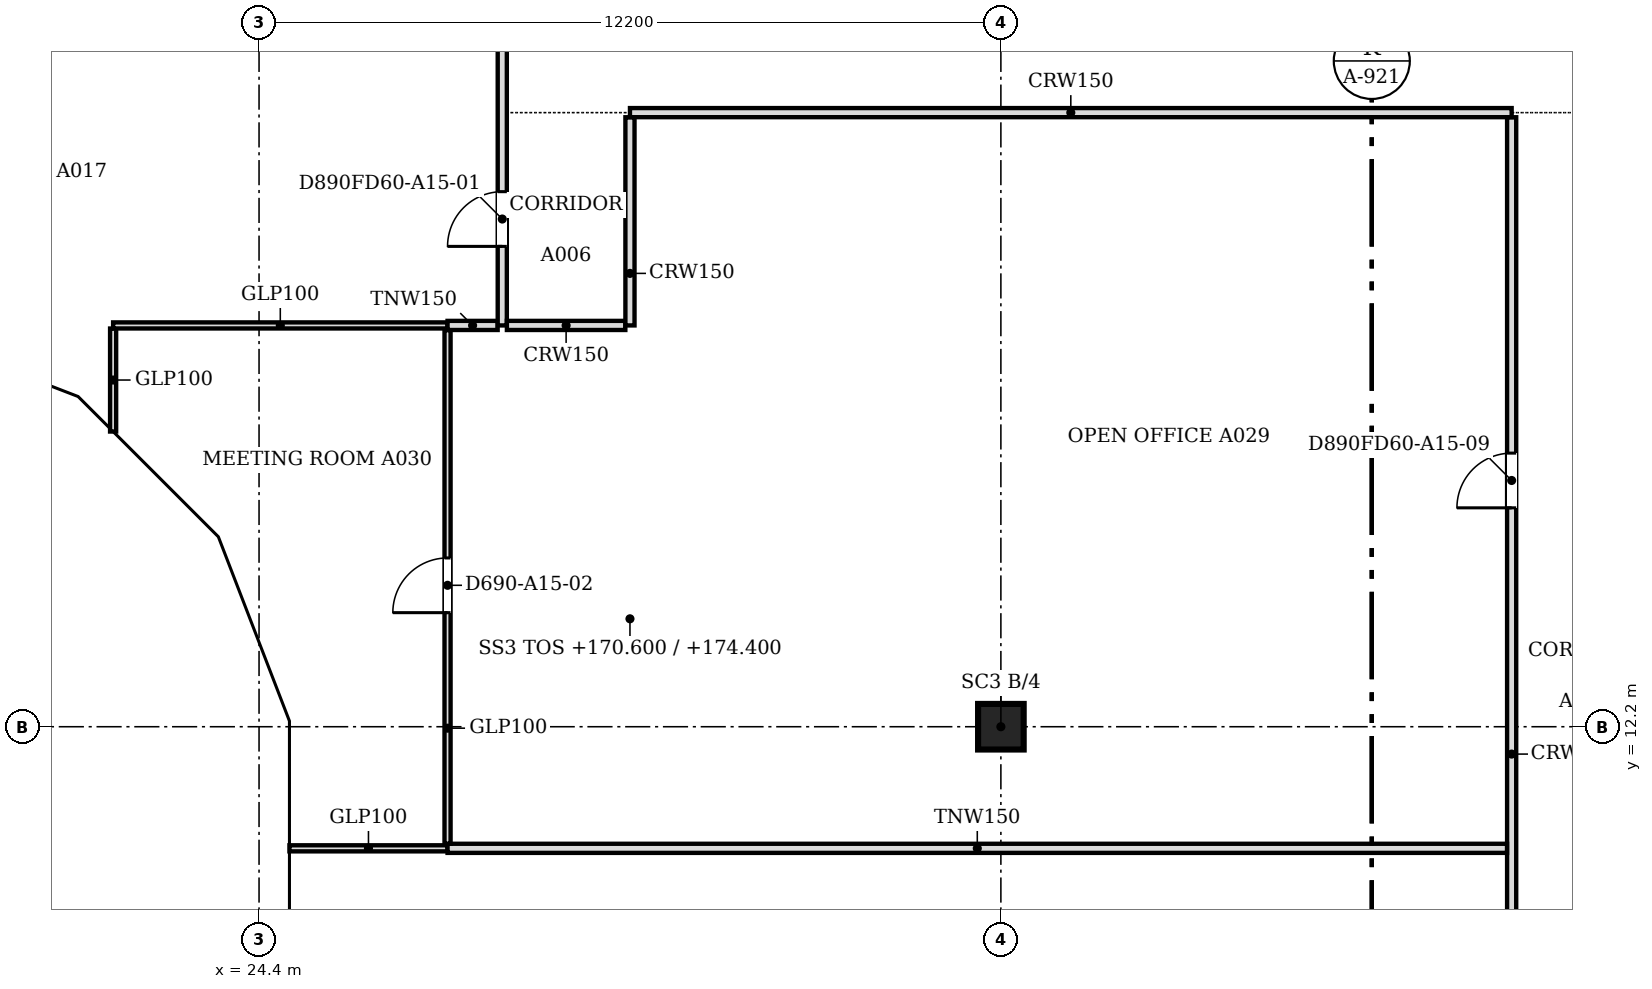
"""IFC4 building model, lengths in metres.
Left out: names, types, materials, properties, quantities, classifications, styles, units other than length and angle.
Written with IfcOpenShell. Run it as: python <this file> out.ifc"""

import sys

from ifc_helpers import new_model, si_unit, direction, frame, frame_2d, origin, origin_2d, place, context, subcontext, project, spatial, polyline, rectangle, outline, extrude, faceted_brep, source, transform, mapped, element, fill, save


model = new_model("IFC4")
c1 = context("Model", 3, precision=1e-05, world=origin(), true_north=direction((0.0, 1.0)))
c2 = subcontext(c1, "Body", "Model", "MODEL_VIEW")
j1 = project(units=[si_unit("LENGTHUNIT", "METRE"), si_unit("PLANEANGLEUNIT", "RADIAN")], contexts=[c1])
p1 = place(None, origin())
s1 = spatial("IfcSite", under=j1, at=p1, CompositionType="ELEMENT")
p2 = place(p1, origin())
s2 = spatial("IfcBuilding", under=s1, at=p2, CompositionType="ELEMENT")
p3 = place(p2, frame((0.0, 0.0, 170.6)))
s3 = spatial("IfcBuildingStorey", under=s2, at=p3, CompositionType="ELEMENT", Elevation=170.6)
p4 = place(p3, frame((36.6, 12.2, 0.0), z_axis=(0.0, 0.0, 1.0), x_axis=(1.0, 0.0, 0.0)))
e1 = element("IfcColumn", 1, at=p4, inside=s3, PredefinedType="COLUMN", context=c2, shape_type="SweptSolid", body=[
    extrude(rectangle(XDim=0.75, YDim=0.75, at=origin_2d()), origin(), (0.0, 0.0, 1.0), 3.6),
])
m1 = source(origin(), c2, "Body", "Brep", [
    faceted_brep([(0.093, -0.25, 0.056), (3.143, -0.25, 3.736), (3.143, -0.25, 3.864), (0.093, -0.25, 7.544), (0.0, 0.25, 7.543), (0.047, 0.25, 7.6), (3.196, 0.25, 3.8), (0.047, 0.25, 0.0), (0.0, 0.25, 0.057), (3.196, -0.0, 3.8), (0.047, 0.0, 0.0), (0.047, 0.0, 7.6)], [[[0, 1, 2, 3]], [[4, 5, 6, 7, 8]], [[7, 6, 9, 1, 0, 10]], [[6, 5, 11, 3, 2, 9]], [[5, 4, 11]], [[8, 7, 10]], [[8, 10, 0, 3, 11, 4]], [[1, 9, 2]]]),
])
p5 = place(p3, frame((18.303, 18.567, -3.8), z_axis=(0.0, 0.0, 1.0), x_axis=(0.932978940178, -0.359930961693, 0.0)))
e2 = element("IfcWall", 2, at=p5, inside=s3, PredefinedType="SOLIDWALL", context=c2, shape_type="MappedRepresentation", body=[
    mapped(m1, transform((0.0, 0.0, 0.0), scale=1.0)),
])
m2 = source(origin(), c2, "Body", "SweptSolid", [
    extrude(outline(polyline([(0.247, 0.633), (2.871, 3.8), (0.247, 6.967), (0.247, 0.633)])), frame((0.0, 0.26, 0.0), z_axis=(0.0, -1.0, 0.0), x_axis=(1.0, 0.0, 0.0)), (0.0, 0.0, 1.0), 0.52),
])
p6 = place(p5, origin())
e3 = element("IfcOpeningElement", 3, at=p6, cuts=e2, PredefinedType="OPENING", context=c2, shape_type="MappedRepresentation", body=[
    mapped(m2, transform((0.0, 0.0, 0.0), scale=1.0)),
])
m3 = source(origin(), c2, "Body", "Brep", [
    faceted_brep([(3.103, -0.25, 7.536), (0.053, -0.25, 3.864), (0.053, -0.25, 3.736), (3.103, -0.25, 0.064), (0.0, 0.25, 3.8), (3.156, 0.25, 7.6), (3.209, 0.25, 7.536), (3.209, 0.25, 0.064), (3.156, 0.25, 0.0), (3.156, -0.0, 0.0), (3.156, -0.0, 7.6), (0.0, 0.0, 3.8)], [[[0, 1, 2, 3]], [[4, 5, 6, 7, 8]], [[8, 7, 9]], [[6, 5, 10]], [[5, 4, 11, 1, 0, 10]], [[4, 8, 9, 3, 2, 11]], [[2, 1, 11]], [[3, 9, 7, 6, 10, 0]]]),
])
p7 = place(p3, frame((21.285, 17.417, -3.8), z_axis=(0.0, 0.0, 1.0), x_axis=(0.707106781187, -0.707106781187, 0.0)))
e4 = element("IfcWall", 4, at=p7, inside=s3, PredefinedType="SOLIDWALL", context=c2, shape_type="MappedRepresentation", body=[
    mapped(m3, transform((0.0, 0.0, 0.0), scale=1.0)),
])
m4 = source(origin(), c2, "Body", "SweptSolid", [
    extrude(outline(polyline([(2.956, 6.968), (0.325, 3.8), (2.956, 0.632), (2.956, 6.968)])), frame((0.0, 0.26, 0.0), z_axis=(0.0, -1.0, 0.0), x_axis=(1.0, 0.0, 0.0)), (0.0, 0.0, 1.0), 0.52),
])
p8 = place(p7, origin())
e5 = element("IfcOpeningElement", 5, at=p8, cuts=e4, PredefinedType="OPENING", context=c2, shape_type="MappedRepresentation", body=[
    mapped(m4, transform((0.0, 0.0, 0.0), scale=1.0)),
])
m5 = source(origin(), c2, "Body", "Brep", [
    faceted_brep([(0.106, -0.25, 0.064), (3.156, -0.25, 3.744), (3.156, -0.25, 3.856), (0.106, -0.25, 7.536), (0.0, 0.25, 7.536), (0.053, 0.25, 7.6), (3.202, 0.25, 3.8), (0.053, 0.25, 0.0), (0.0, 0.25, 0.064), (3.202, -0.0, 3.8), (0.053, 0.0, 0.0), (0.053, 0.0, 7.6)], [[[0, 1, 2, 3]], [[4, 5, 6, 7, 8]], [[7, 6, 9, 1, 0, 10]], [[6, 5, 11, 3, 2, 9]], [[5, 4, 11]], [[8, 7, 10]], [[8, 10, 0, 3, 11, 4]], [[1, 9, 2]]]),
])
p9 = place(p3, frame((23.497, 15.234, -3.8), z_axis=(0.0, 0.0, 1.0), x_axis=(0.359913782069, -0.932985567668, 0.0)))
e6 = element("IfcWall", 6, at=p9, inside=s3, PredefinedType="SOLIDWALL", context=c2, shape_type="MappedRepresentation", body=[
    mapped(m5, transform((0.0, 0.0, 0.0), scale=1.0)),
])
m6 = source(origin(), c2, "Body", "SweptSolid", [
    extrude(outline(polyline([(0.253, 0.633), (2.878, 3.8), (0.253, 6.967), (0.253, 0.633)])), frame((0.0, 0.26, 0.0), z_axis=(0.0, -1.0, 0.0), x_axis=(1.0, 0.0, 0.0)), (0.0, 0.0, 1.0), 0.52),
])
p10 = place(p9, origin())
e7 = element("IfcOpeningElement", 7, at=p10, cuts=e6, PredefinedType="OPENING", context=c2, shape_type="MappedRepresentation", body=[
    mapped(m6, transform((0.0, 0.0, 0.0), scale=1.0)),
])
m7 = source(origin(), c2, "Body", "Brep", [
    faceted_brep([(3.096, -0.25, 0.0), (6.1, -0.25, 3.8), (3.096, -0.25, 7.6), (0.047, -0.25, 3.857), (0.047, -0.25, 3.743), (0.0, 0.25, 3.8), (3.096, 0.25, 7.6), (6.053, 0.25, 3.859), (6.053, 0.25, 3.741), (3.096, 0.25, 0.0), (6.1, -0.0, 3.8), (0.0, 0.0, 3.8)], [[[0, 1, 2, 3, 4]], [[5, 6, 7, 8, 9]], [[9, 8, 10, 1, 0]], [[7, 6, 2, 1, 10]], [[6, 5, 11, 3, 2]], [[5, 9, 0, 4, 11]], [[4, 3, 11]], [[8, 7, 10]]]),
])
p11 = place(p3, frame((24.65, 12.247, -3.8), z_axis=(0.0, 0.0, 1.0), x_axis=(0.0, -1.0, 0.0)))
e8 = element("IfcWall", 8, at=p11, inside=s3, PredefinedType="SOLIDWALL", context=c2, shape_type="MappedRepresentation", body=[
    mapped(m7, transform((0.0, 0.0, 0.0), scale=1.0)),
])
m8 = source(origin(), c2, "Body", "SweptSolid", [
    extrude(outline(polyline([(3.094, 0.399), (5.781, 3.8), (3.094, 7.2), (0.323, 3.8), (3.094, 0.399)])), frame((0.0, 0.26, 0.0), z_axis=(0.0, -1.0, 0.0), x_axis=(1.0, 0.0, 0.0)), (0.0, 0.0, 1.0), 0.52),
])
p12 = place(p11, origin())
e9 = element("IfcOpeningElement", 9, at=p12, cuts=e8, PredefinedType="OPENING", context=c2, shape_type="MappedRepresentation", body=[
    mapped(m8, transform((0.0, 0.0, 0.0), scale=1.0)),
])
p13 = place(p2, frame((0.0, 0.0, 174.4)))
s4 = spatial("IfcBuildingStorey", under=s2, at=p13, CompositionType="ELEMENT", Elevation=174.4)
m9 = source(origin(), c2, "Body", "Brep", [
    faceted_brep([(3.096, -0.25, 7.536), (0.047, -0.25, 3.856), (0.047, -0.25, 3.744), (3.096, -0.25, 0.064), (0.0, 0.25, 3.8), (3.149, 0.25, 7.6), (3.202, 0.25, 7.536), (3.202, 0.25, 0.064), (3.149, 0.25, 0.0), (3.149, -0.0, 0.0), (3.149, -0.0, 7.6), (0.0, 0.0, 3.8)], [[[0, 1, 2, 3]], [[4, 5, 6, 7, 8]], [[8, 7, 9]], [[6, 5, 10]], [[5, 4, 11, 1, 0, 10]], [[4, 8, 9, 3, 2, 11]], [[11, 2, 1]], [[3, 9, 7, 6, 10, 0]]]),
])
p14 = place(p13, frame((18.346, 18.55, -3.8), z_axis=(0.0, 0.0, 1.0), x_axis=(0.932985567668, -0.359913782069, 0.0)))
e10 = element("IfcWall", 10, at=p14, inside=s4, PredefinedType="SOLIDWALL", context=c2, shape_type="MappedRepresentation", body=[
    mapped(m9, transform((0.0, 0.0, 0.0), scale=1.0)),
])
m10 = source(origin(), c2, "Body", "SweptSolid", [
    extrude(outline(polyline([(2.949, 6.967), (0.325, 3.8), (2.949, 0.633), (2.949, 6.967)])), frame((0.0, 0.26, 0.0), z_axis=(0.0, -1.0, 0.0), x_axis=(1.0, 0.0, 0.0)), (0.0, 0.0, 1.0), 0.52),
])
p15 = place(p14, origin())
e11 = element("IfcOpeningElement", 11, at=p15, cuts=e10, PredefinedType="OPENING", context=c2, shape_type="MappedRepresentation", body=[
    mapped(m10, transform((0.0, 0.0, 0.0), scale=1.0)),
])
m11 = source(origin(), c2, "Body", "Brep", [
    faceted_brep([(0.106, -0.25, 0.064), (3.156, -0.25, 3.736), (3.156, -0.25, 3.864), (0.106, -0.25, 7.536), (0.0, 0.25, 7.536), (0.053, 0.25, 7.6), (3.209, 0.25, 3.8), (0.053, 0.25, 0.0), (0.0, 0.25, 0.064), (3.209, -0.0, 3.8), (0.053, 0.0, 0.0), (0.053, 0.0, 7.6)], [[[0, 1, 2, 3]], [[4, 5, 6, 7, 8]], [[7, 6, 9, 1, 0, 10]], [[6, 5, 11, 3, 2, 9]], [[5, 4, 11]], [[8, 7, 10]], [[8, 10, 0, 3, 11, 4]], [[1, 9, 2]]]),
])
p16 = place(p13, frame((21.248, 17.454, -3.8), z_axis=(0.0, 0.0, 1.0), x_axis=(0.707106781187, -0.707106781187, 0.0)))
e12 = element("IfcWall", 12, at=p16, inside=s4, PredefinedType="SOLIDWALL", context=c2, shape_type="MappedRepresentation", body=[
    mapped(m11, transform((0.0, 0.0, 0.0), scale=1.0)),
])
m12 = source(origin(), c2, "Body", "SweptSolid", [
    extrude(outline(polyline([(0.253, 0.632), (2.884, 3.8), (0.253, 6.968), (0.253, 0.632)])), frame((0.0, 0.26, 0.0), z_axis=(0.0, -1.0, 0.0), x_axis=(1.0, 0.0, 0.0)), (0.0, 0.0, 1.0), 0.52),
])
p17 = place(p16, origin())
e13 = element("IfcOpeningElement", 13, at=p17, cuts=e12, PredefinedType="OPENING", context=c2, shape_type="MappedRepresentation", body=[
    mapped(m12, transform((0.0, 0.0, 0.0), scale=1.0)),
])
m13 = source(origin(), c2, "Body", "Brep", [
    faceted_brep([(3.103, -0.25, 7.544), (0.053, -0.25, 3.864), (0.053, -0.25, 3.736), (3.103, -0.25, 0.056), (0.0, 0.25, 3.8), (3.149, 0.25, 7.6), (3.196, 0.25, 7.543), (3.196, 0.25, 0.057), (3.149, 0.25, 0.0), (3.149, -0.0, 0.0), (3.149, -0.0, 7.6), (0.0, 0.0, 3.8)], [[[0, 1, 2, 3]], [[4, 5, 6, 7, 8]], [[8, 7, 9]], [[6, 5, 10]], [[5, 4, 11, 1, 0, 10]], [[4, 8, 9, 3, 2, 11]], [[11, 2, 1]], [[3, 9, 7, 6, 10, 0]]]),
])
p18 = place(p13, frame((23.517, 15.185, -3.8), z_axis=(0.0, 0.0, 1.0), x_axis=(0.359864468756, -0.933004589553, 0.0)))
e14 = element("IfcWall", 14, at=p18, inside=s4, PredefinedType="SOLIDWALL", context=c2, shape_type="MappedRepresentation", body=[
    mapped(m13, transform((0.0, 0.0, 0.0), scale=1.0)),
])
p19 = place(p18, origin())
e15 = element("IfcOpeningElement", 15, at=p19, cuts=e14, PredefinedType="OPENING", context=c2, shape_type="MappedRepresentation", body=[
    mapped(m10, transform((0.0, 0.0, 0.0), scale=1.0)),
])
m14 = source(origin(), c2, "Body", "Brep", [
    faceted_brep([(0.093, -0.25, 0.057), (3.143, -0.25, 3.8), (0.093, -0.25, 7.543), (0.0, 0.25, 7.544), (0.047, 0.25, 7.6), (3.143, 0.25, 3.8), (0.047, 0.25, 0.0), (0.0, 0.25, 0.056), (0.047, 0.0, 0.0), (0.047, 0.0, 7.6)], [[[0, 1, 2]], [[3, 4, 5, 6, 7]], [[6, 5, 1, 0, 8]], [[5, 4, 9, 2, 1]], [[4, 3, 9]], [[7, 6, 8]], [[7, 8, 0, 2, 9, 3]]]),
])
p20 = place(p13, frame((24.65, 12.293, -3.8), z_axis=(0.0, 0.0, 1.0), x_axis=(0.0, -1.0, 0.0)))
e16 = element("IfcWall", 16, at=p20, inside=s4, PredefinedType="SOLIDWALL", context=c2, shape_type="MappedRepresentation", body=[
    mapped(m14, transform((0.0, 0.0, 0.0), scale=1.0)),
])
m15 = source(origin(), c2, "Body", "SweptSolid", [
    extrude(outline(polyline([(0.247, 0.641), (2.821, 3.8), (0.247, 6.959), (0.247, 0.641)])), frame((0.0, 0.26, 0.0), z_axis=(0.0, -1.0, 0.0), x_axis=(1.0, 0.0, 0.0)), (0.0, 0.0, 1.0), 0.52),
])
p21 = place(p20, origin())
e17 = element("IfcOpeningElement", 17, at=p21, cuts=e16, PredefinedType="OPENING", context=c2, shape_type="MappedRepresentation", body=[
    mapped(m15, transform((0.0, 0.0, 0.0), scale=1.0)),
])
p22 = place(p3, frame((45.0, 0.5, 0.0), z_axis=(0.0, 0.0, 1.0), x_axis=(0.0, 1.0, 0.0)))
e18 = element("IfcWall", 18, at=p22, inside=s3, PredefinedType="PARTITIONING", context=c2, shape_type="SweptSolid", body=[
    extrude(rectangle(XDim=21.724, YDim=0.15, at=frame_2d((10.862, 0.0))), origin(), (0.0, 0.0, 1.0), 3.067),
])
m16 = source(origin(), c2, "Body", "SweptSolid", [
    extrude(rectangle(XDim=1.0, YDim=2.1, at=frame_2d((0.5, 1.05))), frame((0.0, 0.085, 0.0), z_axis=(0.0, -1.0, 0.0), x_axis=(1.0, 0.0, 0.0)), (0.0, 0.0, 1.0), 0.17),
])
p23 = place(p22, frame((6.2, 0.0, 0.0)))
e19 = element("IfcOpeningElement", 19, at=p23, cuts=e18, PredefinedType="OPENING", context=c2, shape_type="MappedRepresentation", body=[
    mapped(m16, transform((0.0, 0.0, 0.0), scale=1.0)),
])
m17 = source(origin(), c2, "Body", "SweptSolid", [
    extrude(rectangle(XDim=0.9, YDim=2.1, at=frame_2d((0.45, 1.05))), frame((0.0, 0.085, 0.0), z_axis=(0.0, -1.0, 0.0), x_axis=(1.0, 0.0, 0.0)), (0.0, 0.0, 1.0), 0.17),
])
p24 = place(p22, frame((15.3, 0.0, 0.0)))
e20 = element("IfcOpeningElement", 20, at=p24, cuts=e18, PredefinedType="OPENING", context=c2, shape_type="MappedRepresentation", body=[
    mapped(m17, transform((0.0, 0.0, 0.0), scale=1.0)),
])
p25 = place(p3, frame((24.9, 10.2, 0.0), z_axis=(0.0, 0.0, 1.0), x_axis=(1.0, 0.0, 0.0)))
e21 = element("IfcWall", 21, at=p25, inside=s3, PredefinedType="PARTITIONING", context=c2, shape_type="SweptSolid", body=[
    extrude(rectangle(XDim=2.599, YDim=0.1, at=frame_2d((1.3, 0.0))), origin(), (0.0, 0.0, 1.0), 3.067),
])
p26 = place(p3, frame((27.5, 10.2, 0.0), z_axis=(0.0, 0.0, 1.0), x_axis=(1.0, 0.0, 0.0)))
e22 = element("IfcWall", 22, at=p26, inside=s3, PredefinedType="PARTITIONING", context=c2, shape_type="SweptSolid", body=[
    extrude(rectangle(XDim=17.424, YDim=0.15, at=frame_2d((8.712, 0.0))), origin(), (0.0, 0.0, 1.0), 3.067),
])
p27 = place(p3, frame((27.5, 10.276, 0.0), z_axis=(0.0, 0.0, 1.0), x_axis=(0.0, 1.0, 0.0)))
e23 = element("IfcWall", 23, at=p27, inside=s3, PredefinedType="PARTITIONING", context=c2, shape_type="SweptSolid", body=[
    extrude(rectangle(XDim=8.448, YDim=0.1, at=frame_2d((4.224, 0.0))), origin(), (0.0, 0.0, 1.0), 3.067),
])
m18 = source(origin(), c2, "Body", "SweptSolid", [
    extrude(rectangle(XDim=0.9, YDim=2.1, at=frame_2d((0.45, 1.05))), frame((0.0, 0.06, 0.0), z_axis=(0.0, -1.0, 0.0), x_axis=(1.0, 0.0, 0.0)), (0.0, 0.0, 1.0), 0.12),
])
p28 = place(p27, frame((3.8, 0.0, 0.0)))
e24 = element("IfcOpeningElement", 24, at=p28, cuts=e23, PredefinedType="OPENING", context=c2, shape_type="MappedRepresentation", body=[
    mapped(m18, transform((0.0, 0.0, 0.0), scale=1.0)),
])
p29 = place(p3, frame((22.0, 17.055, 0.0), z_axis=(0.0, 0.0, 1.0), x_axis=(0.0, 1.0, 0.0)))
e25 = element("IfcWall", 25, at=p29, inside=s3, PredefinedType="PARTITIONING", context=c2, shape_type="SweptSolid", body=[
    extrude(rectangle(XDim=1.694, YDim=0.1, at=frame_2d((0.847, 0.0))), origin(), (0.0, 0.0, 1.0), 3.067),
])
p30 = place(p3, frame((22.0, 18.8, 0.0), z_axis=(0.0, 0.0, 1.0), x_axis=(1.0, 0.0, 0.0)))
e26 = element("IfcWall", 26, at=p30, inside=s3, PredefinedType="PARTITIONING", context=c2, shape_type="SweptSolid", body=[
    extrude(rectangle(XDim=5.499, YDim=0.1, at=frame_2d((2.75, 0.0))), origin(), (0.0, 0.0, 1.0), 3.067),
])
p31 = place(p3, frame((27.5, 18.8, 0.0), z_axis=(0.0, 0.0, 1.0), x_axis=(1.0, 0.0, 0.0)))
e27 = element("IfcWall", 27, at=p31, inside=s3, PredefinedType="PARTITIONING", context=c2, shape_type="SweptSolid", body=[
    extrude(rectangle(XDim=0.824, YDim=0.15, at=frame_2d((0.412, 0.0))), origin(), (0.0, 0.0, 1.0), 3.067),
])
p32 = place(p3, frame((28.4, 18.8, 0.0), z_axis=(0.0, 0.0, 1.0), x_axis=(0.0, 1.0, 0.0)))
e28 = element("IfcWall", 28, at=p32, inside=s3, PredefinedType="PARTITIONING", context=c2, shape_type="SweptSolid", body=[
    extrude(rectangle(XDim=26.824, YDim=0.15, at=frame_2d((13.412, 0.0))), origin(), (0.0, 0.0, 1.0), 3.067),
])
p33 = place(p32, frame((1.3, 0.0, 0.0)))
e29 = element("IfcOpeningElement", 29, at=p33, cuts=e28, PredefinedType="OPENING", context=c2, shape_type="MappedRepresentation", body=[
    mapped(m17, transform((0.0, 0.0, 0.0), scale=1.0)),
])
p34 = place(p32, frame((23.351, 0.0, 0.0)))
e30 = element("IfcOpeningElement", 30, at=p34, cuts=e28, PredefinedType="OPENING", context=c2, shape_type="MappedRepresentation", body=[
    mapped(m16, transform((0.0, 0.0, 0.0), scale=1.0)),
])
p35 = place(p32, frame((8.1, 0.0, 0.0)))
e31 = element("IfcOpeningElement", 31, at=p35, cuts=e28, PredefinedType="OPENING", context=c2, shape_type="MappedRepresentation", body=[
    mapped(m16, transform((0.0, 0.0, 0.0), scale=1.0)),
])
p36 = place(p32, frame((15.8, 0.0, 0.0)))
e32 = element("IfcOpeningElement", 32, at=p36, cuts=e28, PredefinedType="OPENING", context=c2, shape_type="MappedRepresentation", body=[
    mapped(m17, transform((0.0, 0.0, 0.0), scale=1.0)),
])
p37 = place(p3, frame((28.476, 18.8, 0.0), z_axis=(0.0, 0.0, 1.0), x_axis=(1.0, 0.0, 0.0)))
e33 = element("IfcWall", 33, at=p37, inside=s3, PredefinedType="PARTITIONING", context=c2, shape_type="SweptSolid", body=[
    extrude(rectangle(XDim=1.948, YDim=0.15, at=frame_2d((0.974, 0.0))), origin(), (0.0, 0.0, 1.0), 3.067),
])
p38 = place(p3, frame((30.5, 18.8, 0.0), z_axis=(0.0, 0.0, 1.0), x_axis=(0.0, 1.0, 0.0)))
e34 = element("IfcWall", 34, at=p38, inside=s3, PredefinedType="PARTITIONING", context=c2, shape_type="SweptSolid", body=[
    extrude(rectangle(XDim=3.424, YDim=0.15, at=frame_2d((1.712, 0.0))), origin(), (0.0, 0.0, 1.0), 3.067),
])
p39 = place(p3, frame((30.5, 22.3, 0.0), z_axis=(0.0, 0.0, 1.0), x_axis=(1.0, 0.0, 0.0)))
e35 = element("IfcWall", 35, at=p39, inside=s3, PredefinedType="PARTITIONING", context=c2, shape_type="SweptSolid", body=[
    extrude(rectangle(XDim=14.5, YDim=0.15, at=frame_2d((7.25, 0.0))), origin(), (0.0, 0.0, 1.0), 3.067),
])
m19 = source(origin(), c2, "Body", "SweptSolid", [
    extrude(rectangle(XDim=0.9, YDim=2.1, at=frame_2d((0.45, 1.05))), frame((0.0, 0.025, 0.0), z_axis=(0.0, -1.0, 0.0), x_axis=(1.0, 0.0, 0.0)), (0.0, 0.0, 1.0), 0.05),
])
p40 = place(p33, origin())
e36 = element("IfcDoor", 36, at=p40, inside=s3, OperationType="SINGLE_SWING_LEFT", PredefinedType="DOOR", context=c2, shape_type="MappedRepresentation", body=[
    mapped(m19, transform((0.0, 0.0, 0.0), scale=1.0)),
])
fill(e29, e36)
p41 = place(p28, origin())
e37 = element("IfcDoor", 37, at=p41, inside=s3, OperationType="SINGLE_SWING_LEFT", PredefinedType="DOOR", context=c2, shape_type="MappedRepresentation", body=[
    mapped(m19, transform((0.0, 0.0, 0.0), scale=1.0)),
])
fill(e24, e37)
p42 = place(p24, origin())
e38 = element("IfcDoor", 38, at=p42, inside=s3, OperationType="SINGLE_SWING_LEFT", PredefinedType="DOOR", context=c2, shape_type="MappedRepresentation", body=[
    mapped(m19, transform((0.0, 0.0, 0.0), scale=1.0)),
])
fill(e20, e38)
save(model, sys.argv[1])
